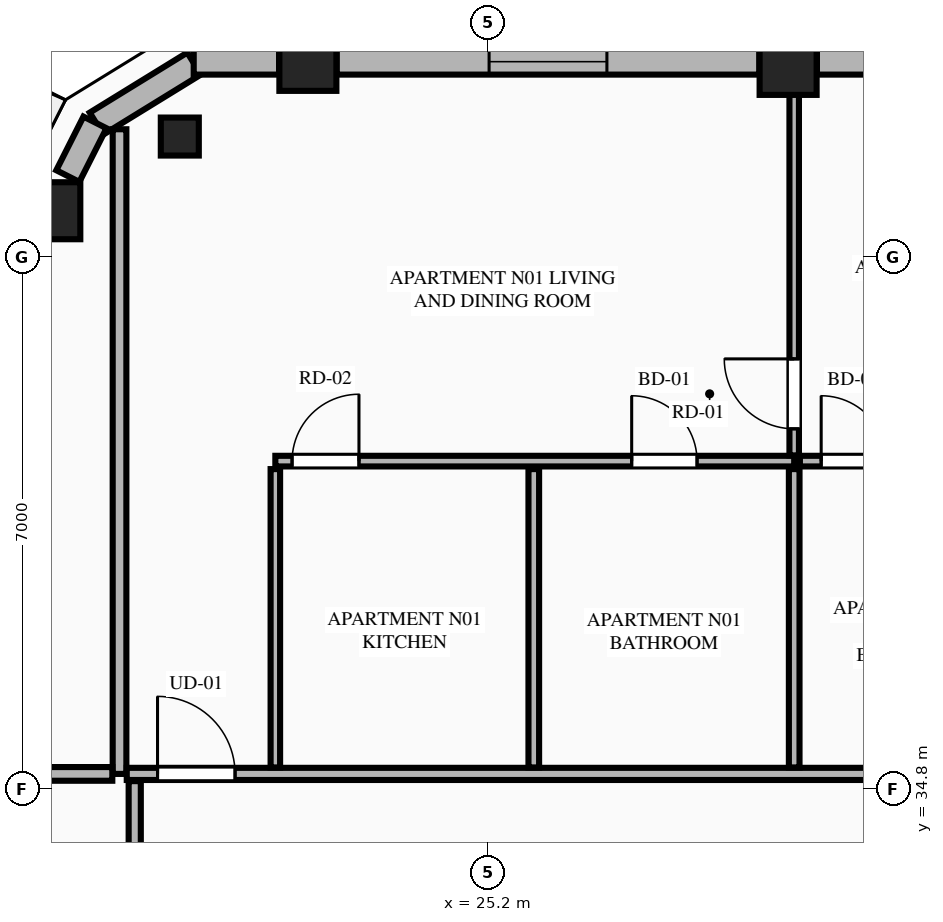
"""IFC4 building model, lengths in metres.
Left out: names, types, materials, properties, quantities, classifications, styles, units other than length and angle.
Written with IfcOpenShell. Run it as: python <this file> out.ifc"""

import sys

from ifc_helpers import new_model, si_unit, direction, frame, frame_2d, origin, origin_2d, place, context, subcontext, project, spatial, rectangle, extrude, element, fill, save


model = new_model("IFC4")
c1 = context("Model", 3, precision=1e-05, world=origin(), true_north=direction((0.0, 1.0)))
c2 = subcontext(c1, "Body", "Model", "MODEL_VIEW")
j1 = project(units=[si_unit("LENGTHUNIT", "METRE"), si_unit("PLANEANGLEUNIT", "RADIAN")], contexts=[c1])
p1 = place(None, origin())
s1 = spatial("IfcSite", under=j1, at=p1, CompositionType="ELEMENT")
p2 = place(p1, origin())
s2 = spatial("IfcBuilding", under=s1, at=p2, CompositionType="ELEMENT")
p3 = place(p2, frame((0.0, 0.0, 256.2)))
s3 = spatial("IfcBuildingStorey", under=s2, at=p3, CompositionType="ELEMENT", Elevation=256.2)
for number, where, z_axis, x_axis in (
    (1, (29.146, 44.308, 0.0), (0.0, 0.0, 1.0), (1.0, 0.0, 0.0)),
    (2, (22.828, 44.361, 0.0), (0.0, 0.0, 1.0), (1.0, 0.0, 0.0)),
    (3, (19.459, 42.409, 0.0), (0.0, 0.0, 1.0), (1.0, 0.0, 0.0)),
):
    element("IfcColumn", number, at=place(p3, frame(where, z_axis=z_axis, x_axis=x_axis)), inside=s3, PredefinedType="COLUMN", context=c2, shape_type="SweptSolid", body=[
        extrude(rectangle(XDim=0.75, YDim=0.75, at=origin_2d()), origin(), (0.0, 0.0, 1.0), 3.65),
    ])
p4 = place(p3, frame((21.143, 43.385, 0.0), z_axis=(0.0, 0.0, 1.0), x_axis=(-0.865256437757, -0.501329529272, 0.0)))
e4 = element("IfcColumn", 4, at=p4, inside=s3, PredefinedType="PILASTER", context=c2, shape_type="SweptSolid", body=[
    extrude(rectangle(XDim=0.5, YDim=0.35, at=origin_2d()), origin(), (0.0, 0.0, 1.0), 3.65),
])
p5 = place(p3, frame((21.331, 44.345, 0.0), z_axis=(0.0, 0.0, 1.0), x_axis=(-0.851680557619, -0.52406128246, 0.0)))
e5 = element("IfcWall", 5, at=p5, inside=s3, PredefinedType="STANDARD", context=c2, shape_type="SweptSolid", body=[
    extrude(rectangle(XDim=1.508, YDim=0.34, at=frame_2d((0.754, 0.0))), origin(), (0.0, 0.0, 1.0), 3.45),
])
p6 = place(p3, frame((35.275, 44.37, 0.0), z_axis=(0.0, 0.0, 1.0), x_axis=(-1.0, 0.0, 0.0)))
e6 = element("IfcWall", 6, at=p6, inside=s3, PredefinedType="STANDARD", context=c2, shape_type="SweptSolid", body=[
    extrude(rectangle(XDim=5.75, YDim=0.34, at=frame_2d((2.875, 0.0))), origin(), (0.0, 0.0, 1.0), 2.983),
])
p7 = place(p6, frame((2.325, 0.0, 0.75)))
e7 = element("IfcOpeningElement", 7, at=p7, cuts=e6, PredefinedType="OPENING", context=c2, shape_type="SweptSolid", body=[
    extrude(rectangle(XDim=1.1, YDim=2.0, at=frame_2d((0.55, 1.0))), frame((0.0, 0.18, 0.0), z_axis=(0.0, -1.0, 0.0), x_axis=(1.0, 0.0, 0.0)), (0.0, 0.0, 1.0), 0.36),
])
p8 = place(p3, frame((28.767, 44.37, 0.0), z_axis=(0.0, 0.0, 1.0), x_axis=(-1.0, 0.0, 0.0)))
e8 = element("IfcWall", 8, at=p8, inside=s3, PredefinedType="STANDARD", context=c2, shape_type="SweptSolid", body=[
    extrude(rectangle(XDim=5.56, YDim=0.34, at=frame_2d((2.78, 0.0))), origin(), (0.0, 0.0, 1.0), 2.983),
])
p9 = place(p8, frame((2.005, 0.0, 0.75)))
e9 = element("IfcOpeningElement", 9, at=p9, cuts=e8, PredefinedType="OPENING", context=c2, shape_type="SweptSolid", body=[
    extrude(rectangle(XDim=1.55, YDim=2.05, at=frame_2d((0.775, 1.025))), frame((0.0, 0.18, 0.0), z_axis=(0.0, -1.0, 0.0), x_axis=(1.0, 0.0, 0.0)), (0.0, 0.0, 1.0), 0.36),
])
p10 = place(p3, frame((22.449, 44.37, 0.0), z_axis=(0.0, 0.0, 1.0), x_axis=(-1.0, 0.0, 0.0)))
e10 = element("IfcWall", 10, at=p10, inside=s3, PredefinedType="STANDARD", context=c2, shape_type="SweptSolid", body=[
    extrude(rectangle(XDim=1.123, YDim=0.34, at=frame_2d((0.562, 0.0))), origin(), (0.0, 0.0, 1.0), 3.45),
])
p11 = place(p3, frame((20.027, 43.571, 0.0), z_axis=(0.0, 0.0, 1.0), x_axis=(-0.451404919072, -0.89231922485, 0.0)))
e11 = element("IfcWall", 11, at=p11, inside=s3, PredefinedType="STANDARD", context=c2, shape_type="SweptSolid", body=[
    extrude(rectangle(XDim=0.791, YDim=0.34, at=frame_2d((0.396, 0.0))), origin(), (0.0, 0.0, 1.0), 3.45),
])
p12 = place(p3, frame((20.35, 35.0, 0.0), z_axis=(0.0, 0.0, 1.0), x_axis=(0.0, 1.0, 0.0)))
e12 = element("IfcWall", 12, at=p12, inside=s3, PredefinedType="PARTITIONING", context=c2, shape_type="SweptSolid", body=[
    extrude(rectangle(XDim=8.481, YDim=0.18, at=frame_2d((4.24, 0.0))), origin(), (0.0, 0.0, 1.0), 3.45),
])
p13 = place(p3, frame((20.445, 35.0, 0.0), z_axis=(0.0, 0.0, 1.0), x_axis=(1.0, 0.0, 0.0)))
e13 = element("IfcWall", 13, at=p13, inside=s3, PredefinedType="PARTITIONING", context=c2, shape_type="SweptSolid", body=[
    extrude(rectangle(XDim=15.114, YDim=0.16, at=frame_2d((7.557, 0.0))), origin(), (0.0, 0.0, 1.0), 3.45),
])
p14 = place(p13, frame((0.405, 0.0, 0.0)))
e14 = element("IfcOpeningElement", 14, at=p14, cuts=e13, PredefinedType="OPENING", context=c2, shape_type="SweptSolid", body=[
    extrude(rectangle(XDim=1.02, YDim=2.25, at=frame_2d((0.51, 1.125))), frame((0.0, 0.09, 0.0), z_axis=(0.0, -1.0, 0.0), x_axis=(1.0, 0.0, 0.0)), (0.0, 0.0, 1.0), 0.18),
])
p15 = place(p3, frame((22.4, 35.085, 0.0), z_axis=(0.0, 0.0, 1.0), x_axis=(0.0, 1.0, 0.0)))
e15 = element("IfcWall", 15, at=p15, inside=s3, PredefinedType="PARTITIONING", context=c2, shape_type="SweptSolid", body=[
    extrude(rectangle(XDim=3.925, YDim=0.125, at=frame_2d((1.962, 0.0))), origin(), (0.0, 0.0, 1.0), 3.45),
])
p16 = place(p3, frame((22.4, 39.115, 0.0), z_axis=(0.0, 0.0, 1.0), x_axis=(1.0, 0.0, 0.0)))
e16 = element("IfcWall", 16, at=p16, inside=s3, PredefinedType="PLUMBINGWALL", context=c2, shape_type="SweptSolid", body=[
    extrude(rectangle(XDim=6.826, YDim=0.14, at=frame_2d((3.413, 0.0))), origin(), (0.0, 0.0, 1.0), 3.45),
])
p17 = place(p16, frame((4.688, 0.0, 0.0)))
e17 = element("IfcOpeningElement", 17, at=p17, cuts=e16, PredefinedType="OPENING", context=c2, shape_type="SweptSolid", body=[
    extrude(rectangle(XDim=0.86, YDim=2.1, at=frame_2d((0.43, 1.05))), frame((0.0, 0.08, 0.0), z_axis=(0.0, -1.0, 0.0), x_axis=(1.0, 0.0, 0.0)), (0.0, 0.0, 1.0), 0.16),
])
p18 = place(p16, frame((0.22, 0.0, 0.0)))
e18 = element("IfcOpeningElement", 18, at=p18, cuts=e16, PredefinedType="OPENING", context=c2, shape_type="SweptSolid", body=[
    extrude(rectangle(XDim=0.88, YDim=2.15, at=frame_2d((0.44, 1.075))), frame((0.0, 0.08, 0.0), z_axis=(0.0, -1.0, 0.0), x_axis=(1.0, 0.0, 0.0)), (0.0, 0.0, 1.0), 0.16),
])
p19 = place(p3, frame((29.301, 39.115, 0.0), z_axis=(0.0, 0.0, 1.0), x_axis=(1.0, 0.0, 0.0)))
e19 = element("IfcWall", 19, at=p19, inside=s3, PredefinedType="PLUMBINGWALL", context=c2, shape_type="SweptSolid", body=[
    extrude(rectangle(XDim=6.258, YDim=0.14, at=frame_2d((3.129, 0.0))), origin(), (0.0, 0.0, 1.0), 3.45),
])
p20 = place(p19, frame((0.28, 0.0, 0.0)))
e20 = element("IfcOpeningElement", 20, at=p20, cuts=e19, PredefinedType="OPENING", context=c2, shape_type="SweptSolid", body=[
    extrude(rectangle(XDim=0.86, YDim=2.1, at=frame_2d((0.43, 1.05))), frame((0.0, 0.08, 0.0), z_axis=(0.0, -1.0, 0.0), x_axis=(1.0, 0.0, 0.0)), (0.0, 0.0, 1.0), 0.16),
])
p21 = place(p19, frame((3.188, 0.0, 0.0)))
e21 = element("IfcOpeningElement", 21, at=p21, cuts=e19, PredefinedType="OPENING", context=c2, shape_type="SweptSolid", body=[
    extrude(rectangle(XDim=0.88, YDim=2.15, at=frame_2d((0.44, 1.075))), frame((0.0, 0.08, 0.0), z_axis=(0.0, -1.0, 0.0), x_axis=(1.0, 0.0, 0.0)), (0.0, 0.0, 1.0), 0.16),
])
p22 = place(p3, frame((25.8, 35.085, 0.0), z_axis=(0.0, 0.0, 1.0), x_axis=(0.0, 1.0, 0.0)))
e22 = element("IfcWall", 22, at=p22, inside=s3, PredefinedType="PLUMBINGWALL", context=c2, shape_type="SweptSolid", body=[
    extrude(rectangle(XDim=3.925, YDim=0.14, at=frame_2d((1.962, 0.0))), origin(), (0.0, 0.0, 1.0), 3.45),
])
p23 = place(p3, frame((29.226, 35.085, 0.0), z_axis=(0.0, 0.0, 1.0), x_axis=(0.0, 1.0, 0.0)))
e23 = element("IfcWall", 23, at=p23, inside=s3, PredefinedType="PLUMBINGWALL", context=c2, shape_type="SweptSolid", body=[
    extrude(rectangle(XDim=3.925, YDim=0.14, at=frame_2d((1.962, 0.0))), origin(), (0.0, 0.0, 1.0), 2.907),
])
p24 = place(p3, frame((29.226, 39.19, 0.0), z_axis=(0.0, 0.0, 1.0), x_axis=(0.0, 1.0, 0.0)))
e24 = element("IfcWall", 24, at=p24, inside=s3, PredefinedType="PARTITIONING", context=c2, shape_type="SweptSolid", body=[
    extrude(rectangle(XDim=5.095, YDim=0.125, at=frame_2d((2.547, 0.0))), origin(), (0.0, 0.0, 1.0), 2.907),
])
p25 = place(p24, frame((0.35, 0.0, 0.0)))
e25 = element("IfcOpeningElement", 25, at=p25, cuts=e24, PredefinedType="OPENING", context=c2, shape_type="SweptSolid", body=[
    extrude(rectangle(XDim=0.92, YDim=2.15, at=frame_2d((0.46, 1.075))), frame((0.0, 0.073, 0.0), z_axis=(0.0, -1.0, 0.0), x_axis=(1.0, 0.0, 0.0)), (0.0, 0.0, 1.0), 0.145),
])
p26 = place(p3, frame((15.933, 35.0, 0.0), z_axis=(0.0, 0.0, 1.0), x_axis=(1.0, 0.0, 0.0)))
e26 = element("IfcWall", 26, at=p26, inside=s3, PredefinedType="PARTITIONING", context=c2, shape_type="SweptSolid", body=[
    extrude(rectangle(XDim=4.322, YDim=0.18, at=frame_2d((2.161, 0.0))), origin(), (0.0, 0.0, 1.0), 3.45),
])
p27 = place(p3, frame((20.55, 25.051, 0.0), z_axis=(0.0, 0.0, 1.0), x_axis=(0.0, 1.0, 0.0)))
e27 = element("IfcWall", 27, at=p27, inside=s3, PredefinedType="PARTITIONING", context=c2, shape_type="SweptSolid", body=[
    extrude(rectangle(XDim=9.854, YDim=0.16, at=frame_2d((4.927, 0.0))), origin(), (0.0, 0.0, 1.0), 3.137),
])
p28 = place(p27, frame((0.45, 0.0, 0.0)))
e28 = element("IfcOpeningElement", 28, at=p28, cuts=e27, PredefinedType="OPENING", context=c2, shape_type="SweptSolid", body=[
    extrude(rectangle(XDim=1.02, YDim=2.25, at=frame_2d((0.51, 1.125))), frame((0.0, 0.09, 0.0), z_axis=(0.0, -1.0, 0.0), x_axis=(1.0, 0.0, 0.0)), (0.0, 0.0, 1.0), 0.18),
])
p29 = place(p9, origin())
e29 = element("IfcWindow", 29, at=p29, inside=s3, PartitioningType="SINGLE_PANEL", PredefinedType="WINDOW", context=c2, shape_type="SweptSolid", body=[
    extrude(rectangle(XDim=1.55, YDim=2.05, at=frame_2d((0.775, 1.025))), frame((0.0, 0.03, 0.0), z_axis=(0.0, -1.0, 0.0), x_axis=(1.0, 0.0, 0.0)), (0.0, 0.0, 1.0), 0.06),
])
fill(e9, e29)
p30 = place(p17, origin())
e30 = element("IfcDoor", 30, at=p30, inside=s3, OperationType="SINGLE_SWING_LEFT", PredefinedType="DOOR", context=c2, shape_type="SweptSolid", body=[
    extrude(rectangle(XDim=0.86, YDim=2.1, at=frame_2d((0.43, 1.05))), frame((0.0, 0.025, 0.0), z_axis=(0.0, -1.0, 0.0), x_axis=(1.0, 0.0, 0.0)), (0.0, 0.0, 1.0), 0.05),
])
fill(e17, e30)
p31 = place(p20, origin())
e31 = element("IfcDoor", 31, at=p31, inside=s3, OperationType="SINGLE_SWING_LEFT", PredefinedType="DOOR", context=c2, shape_type="SweptSolid", body=[
    extrude(rectangle(XDim=0.86, YDim=2.1, at=frame_2d((0.43, 1.05))), frame((0.0, 0.025, 0.0), z_axis=(0.0, -1.0, 0.0), x_axis=(1.0, 0.0, 0.0)), (0.0, 0.0, 1.0), 0.05),
])
fill(e20, e31)
p32 = place(p14, origin())
e32 = element("IfcDoor", 32, at=p32, inside=s3, OperationType="SINGLE_SWING_LEFT", PredefinedType="DOOR", context=c2, shape_type="SweptSolid", body=[
    extrude(rectangle(XDim=1.02, YDim=2.25, at=frame_2d((0.51, 1.125))), frame((0.0, 0.025, 0.0), z_axis=(0.0, -1.0, 0.0), x_axis=(1.0, 0.0, 0.0)), (0.0, 0.0, 1.0), 0.05),
])
fill(e14, e32)
p33 = place(p18, origin())
e33 = element("IfcDoor", 33, at=p33, inside=s3, OperationType="SINGLE_SWING_RIGHT", PredefinedType="DOOR", context=c2, shape_type="SweptSolid", body=[
    extrude(rectangle(XDim=0.88, YDim=2.15, at=frame_2d((0.44, 1.075))), frame((0.0, 0.025, 0.0), z_axis=(0.0, -1.0, 0.0), x_axis=(1.0, 0.0, 0.0)), (0.0, 0.0, 1.0), 0.05),
])
fill(e18, e33)
p34 = place(p25, origin())
e34 = element("IfcDoor", 34, at=p34, inside=s3, OperationType="SINGLE_SWING_RIGHT", PredefinedType="DOOR", context=c2, shape_type="SweptSolid", body=[
    extrude(rectangle(XDim=0.92, YDim=2.15, at=frame_2d((0.46, 1.075))), frame((0.0, 0.025, 0.0), z_axis=(0.0, -1.0, 0.0), x_axis=(1.0, 0.0, 0.0)), (0.0, 0.0, 1.0), 0.05),
])
fill(e25, e34)
save(model, sys.argv[1])
